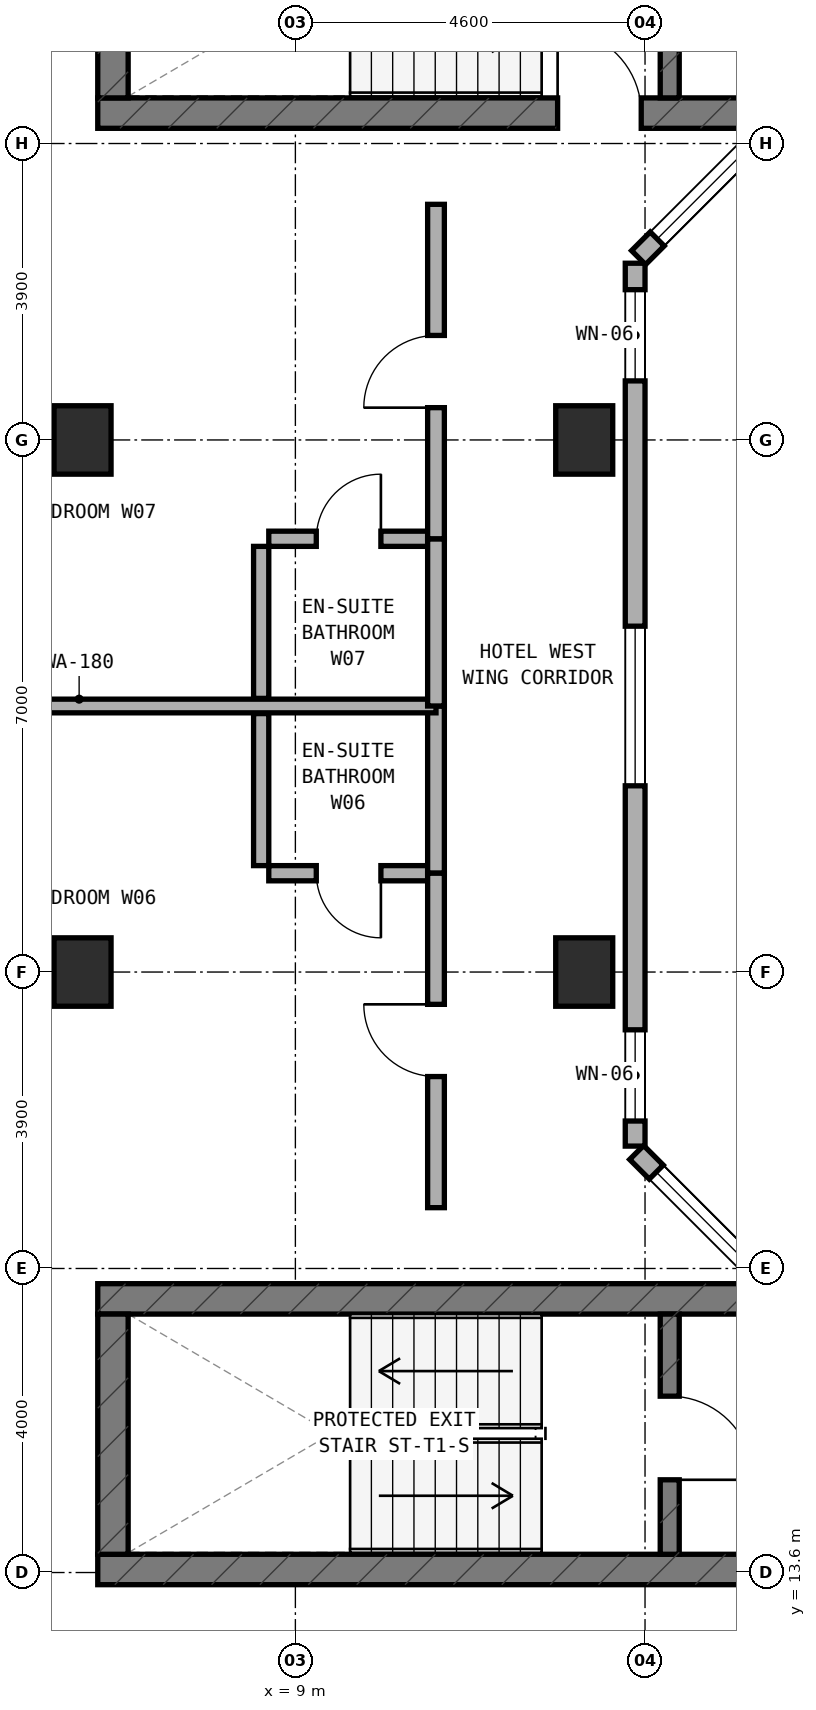
"""IFC4 building model, lengths in metres.
Left out: names, types, materials, properties, quantities, classifications, styles, units other than length and angle.
Written with IfcOpenShell. Run it as: python <this file> out.ifc"""

import sys

from ifc_helpers import new_model, si_unit, direction, frame, frame_2d, origin, origin_2d, place, context, subcontext, project, spatial, rectangle, extrude, element, fill, save


model = new_model("IFC4")
c1 = context("Model", 3, precision=1e-05, world=origin(), true_north=direction((0.0, 1.0)))
c2 = subcontext(c1, "Body", "Model", "MODEL_VIEW")
j1 = project(units=[si_unit("LENGTHUNIT", "METRE"), si_unit("PLANEANGLEUNIT", "RADIAN")], contexts=[c1])
p1 = place(None, origin())
s1 = spatial("IfcSite", under=j1, at=p1, CompositionType="ELEMENT")
p2 = place(p1, origin())
s2 = spatial("IfcBuilding", under=s1, at=p2, CompositionType="ELEMENT")
p3 = place(p2, frame((0.0, 0.0, 191.9)))
s3 = spatial("IfcBuildingStorey", under=s2, at=p3, CompositionType="ELEMENT", Elevation=191.9)
p4 = place(p3, frame((6.4, 32.8, 0.0), z_axis=(0.0, 0.0, 1.0), x_axis=(1.0, 0.0, 0.0)))
e1 = element("IfcWall", 1, at=p4, inside=s3, PredefinedType="SHEAR", context=c2, shape_type="SweptSolid", body=[
    extrude(rectangle(XDim=24.4, YDim=0.4, at=frame_2d((12.2, 0.0))), origin(), (0.0, 0.0, 1.0), 3.6),
])
p5 = place(p4, frame((6.05, 0.0, 0.0)))
e2 = element("IfcOpeningElement", 2, at=p5, cuts=e1, PredefinedType="OPENING", context=c2, shape_type="SweptSolid", body=[
    extrude(rectangle(XDim=1.1, YDim=2.15, at=frame_2d((0.55, 1.075))), frame((0.0, 0.21, 0.0), z_axis=(0.0, -1.0, 0.0), x_axis=(1.0, 0.0, 0.0)), (0.0, 0.0, 1.0), 0.42),
])
p6 = place(p3, frame((6.6, 33.0, 0.0), z_axis=(0.0, 0.0, 1.0), x_axis=(0.0, 1.0, 0.0)))
e3 = element("IfcWall", 3, at=p6, inside=s3, PredefinedType="SHEAR", context=c2, shape_type="SweptSolid", body=[
    extrude(rectangle(XDim=3.16, YDim=0.4, at=frame_2d((1.58, 0.0))), origin(), (0.0, 0.0, 1.0), 3.6),
])
p7 = place(p3, frame((13.925, 33.0, 0.0), z_axis=(0.0, 0.0, 1.0), x_axis=(0.0, 1.0, 0.0)))
e4 = element("IfcWall", 4, at=p7, inside=s3, PredefinedType="STANDARD", context=c2, shape_type="SweptSolid", body=[
    extrude(rectangle(XDim=3.16, YDim=0.25, at=frame_2d((1.58, 0.0))), origin(), (0.0, 0.0, 1.0), 3.32),
])
p8 = place(p7, frame((0.98, 0.0, 0.0)))
e5 = element("IfcOpeningElement", 5, at=p8, cuts=e4, PredefinedType="OPENING", context=c2, shape_type="SweptSolid", body=[
    extrude(rectangle(XDim=1.1, YDim=2.15, at=frame_2d((0.55, 1.075))), frame((0.0, 0.135, 0.0), z_axis=(0.0, -1.0, 0.0), x_axis=(1.0, 0.0, 0.0)), (0.0, 0.0, 1.0), 0.27),
])
p9 = place(p3, frame((6.4, 13.64, 0.0), z_axis=(0.0, 0.0, 1.0), x_axis=(1.0, 0.0, 0.0)))
e6 = element("IfcWall", 6, at=p9, inside=s3, PredefinedType="SHEAR", context=c2, shape_type="SweptSolid", body=[
    extrude(rectangle(XDim=24.4, YDim=0.4, at=frame_2d((12.2, 0.0))), origin(), (0.0, 0.0, 1.0), 3.6),
])
p10 = place(p9, frame((9.15, 0.0, 0.0)))
e7 = element("IfcOpeningElement", 7, at=p10, cuts=e6, PredefinedType="OPENING", context=c2, shape_type="SweptSolid", body=[
    extrude(rectangle(XDim=1.2, YDim=2.15, at=frame_2d((0.6, 1.075))), frame((0.0, 0.21, 0.0), z_axis=(0.0, -1.0, 0.0), x_axis=(1.0, 0.0, 0.0)), (0.0, 0.0, 1.0), 0.42),
])
p11 = place(p9, frame((16.94, 0.0, 0.0)))
e8 = element("IfcOpeningElement", 8, at=p11, cuts=e6, PredefinedType="OPENING", context=c2, shape_type="SweptSolid", body=[
    extrude(rectangle(XDim=0.85, YDim=2.1, at=frame_2d((0.425, 1.05))), frame((0.0, 0.21, 0.0), z_axis=(0.0, -1.0, 0.0), x_axis=(1.0, 0.0, 0.0)), (0.0, 0.0, 1.0), 0.42),
])
p12 = place(p9, frame((18.783, 0.0, 0.0)))
e9 = element("IfcOpeningElement", 9, at=p12, cuts=e6, PredefinedType="OPENING", context=c2, shape_type="SweptSolid", body=[
    extrude(rectangle(XDim=1.1, YDim=2.15, at=frame_2d((0.55, 1.075))), frame((0.0, 0.21, 0.0), z_axis=(0.0, -1.0, 0.0), x_axis=(1.0, 0.0, 0.0)), (0.0, 0.0, 1.0), 0.42),
])
p13 = place(p9, frame((20.65, 0.0, 0.0)))
e10 = element("IfcOpeningElement", 10, at=p13, cuts=e6, PredefinedType="OPENING", context=c2, shape_type="SweptSolid", body=[
    extrude(rectangle(XDim=1.1, YDim=2.15, at=frame_2d((0.55, 1.075))), frame((0.0, 0.21, 0.0), z_axis=(0.0, -1.0, 0.0), x_axis=(1.0, 0.0, 0.0)), (0.0, 0.0, 1.0), 0.42),
])
p14 = place(p9, frame((22.517, 0.0, 0.0)))
e11 = element("IfcOpeningElement", 11, at=p14, cuts=e6, PredefinedType="OPENING", context=c2, shape_type="SweptSolid", body=[
    extrude(rectangle(XDim=1.1, YDim=2.15, at=frame_2d((0.55, 1.075))), frame((0.0, 0.21, 0.0), z_axis=(0.0, -1.0, 0.0), x_axis=(1.0, 0.0, 0.0)), (0.0, 0.0, 1.0), 0.42),
])
p15 = place(p3, frame((6.4, 17.2, 0.0), z_axis=(0.0, 0.0, 1.0), x_axis=(1.0, 0.0, 0.0)))
e12 = element("IfcWall", 12, at=p15, inside=s3, PredefinedType="SHEAR", context=c2, shape_type="SweptSolid", body=[
    extrude(rectangle(XDim=24.4, YDim=0.4, at=frame_2d((12.2, 0.0))), origin(), (0.0, 0.0, 1.0), 3.6),
])
p16 = place(p3, frame((6.6, 13.84, 0.0), z_axis=(0.0, 0.0, 1.0), x_axis=(0.0, 1.0, 0.0)))
e13 = element("IfcWall", 13, at=p16, inside=s3, PredefinedType="SHEAR", context=c2, shape_type="SweptSolid", body=[
    extrude(rectangle(XDim=3.16, YDim=0.4, at=frame_2d((1.58, 0.0))), origin(), (0.0, 0.0, 1.0), 3.6),
])
p17 = place(p3, frame((13.925, 13.84, 0.0), z_axis=(0.0, 0.0, 1.0), x_axis=(0.0, 1.0, 0.0)))
e14 = element("IfcWall", 14, at=p17, inside=s3, PredefinedType="STANDARD", context=c2, shape_type="SweptSolid", body=[
    extrude(rectangle(XDim=3.16, YDim=0.25, at=frame_2d((1.58, 0.0))), origin(), (0.0, 0.0, 1.0), 3.32),
])
p18 = place(p17, frame((0.98, 0.0, 0.0)))
e15 = element("IfcOpeningElement", 15, at=p18, cuts=e14, PredefinedType="OPENING", context=c2, shape_type="SweptSolid", body=[
    extrude(rectangle(XDim=1.1, YDim=2.15, at=frame_2d((0.55, 1.075))), frame((0.0, 0.135, 0.0), z_axis=(0.0, -1.0, 0.0), x_axis=(1.0, 0.0, 0.0)), (0.0, 0.0, 1.0), 0.27),
])
for number, where, z_axis, x_axis in (
    (16, (6.2, 21.5, 0.0), (0.0, 0.0, 1.0), (1.0, 0.0, 0.0)),
    (17, (6.2, 28.5, 0.0), (0.0, 0.0, 1.0), (1.0, 0.0, 0.0)),
    (18, (12.8, 21.5, 0.0), (0.0, 0.0, 1.0), (1.0, 0.0, 0.0)),
    (19, (12.8, 28.5, 0.0), (0.0, 0.0, 1.0), (1.0, 0.0, 0.0)),
):
    element("IfcColumn", number, at=place(p3, frame(where, z_axis=z_axis, x_axis=x_axis)), inside=s3, PredefinedType="COLUMN", context=c2, shape_type="SweptSolid", body=[
        extrude(rectangle(XDim=0.75, YDim=0.9, at=origin_2d()), origin(), (0.0, 0.0, 1.0), 3.6),
    ])
p19 = place(p3, frame((15.278, 17.338, 0.0), z_axis=(0.0, 0.0, 1.0), x_axis=(-0.707106781187, 0.707106781187, 0.0)))
e20 = element("IfcWall", 20, at=p19, inside=s3, PredefinedType="STANDARD", context=c2, shape_type="SweptSolid", body=[
    extrude(rectangle(XDim=2.529, YDim=0.26, at=frame_2d((1.264, 0.0))), origin(), (0.0, 0.0, 1.0), 3.32),
])
p20 = place(p19, frame((0.364, 0.0, 0.85)))
e21 = element("IfcOpeningElement", 21, at=p20, cuts=e20, PredefinedType="OPENING", context=c2, shape_type="SweptSolid", body=[
    extrude(rectangle(XDim=1.8, YDim=1.5, at=frame_2d((0.9, 0.75))), frame((0.0, 0.14, 0.0), z_axis=(0.0, -1.0, 0.0), x_axis=(1.0, 0.0, 0.0)), (0.0, 0.0, 1.0), 0.28),
])
p21 = place(p3, frame((13.47, 19.21, 0.0), z_axis=(0.0, 0.0, 1.0), x_axis=(0.0, 1.0, 0.0)))
e22 = element("IfcWall", 22, at=p21, inside=s3, PredefinedType="STANDARD", context=c2, shape_type="SweptSolid", body=[
    extrude(rectangle(XDim=11.615, YDim=0.26, at=frame_2d((5.808, 0.0))), origin(), (0.0, 0.0, 1.0), 3.32),
])
p22 = place(p21, frame((0.33, 0.0, 0.5)))
e23 = element("IfcOpeningElement", 23, at=p22, cuts=e22, PredefinedType="OPENING", context=c2, shape_type="SweptSolid", body=[
    extrude(rectangle(XDim=1.2, YDim=1.9, at=frame_2d((0.6, 0.95))), frame((0.0, 0.14, 0.0), z_axis=(0.0, -1.0, 0.0), x_axis=(1.0, 0.0, 0.0)), (0.0, 0.0, 1.0), 0.28),
])
p23 = place(p21, frame((4.74, 0.0, 0.85)))
e24 = element("IfcOpeningElement", 24, at=p23, cuts=e22, PredefinedType="OPENING", context=c2, shape_type="SweptSolid", body=[
    extrude(rectangle(XDim=2.1, YDim=1.5, at=frame_2d((1.05, 0.75))), frame((0.0, 0.14, 0.0), z_axis=(0.0, -1.0, 0.0), x_axis=(1.0, 0.0, 0.0)), (0.0, 0.0, 1.0), 0.28),
])
p24 = place(p21, frame((10.067, 0.0, 0.5)))
e25 = element("IfcOpeningElement", 25, at=p24, cuts=e22, PredefinedType="OPENING", context=c2, shape_type="SweptSolid", body=[
    extrude(rectangle(XDim=1.2, YDim=1.9, at=frame_2d((0.6, 0.95))), frame((0.0, 0.14, 0.0), z_axis=(0.0, -1.0, 0.0), x_axis=(1.0, 0.0, 0.0)), (0.0, 0.0, 1.0), 0.28),
])
p25 = place(p3, frame((13.515, 30.899, 0.0), z_axis=(0.0, 0.0, 1.0), x_axis=(0.707106781187, 0.707106781187, 0.0)))
e26 = element("IfcWall", 26, at=p25, inside=s3, PredefinedType="STANDARD", context=c2, shape_type="SweptSolid", body=[
    extrude(rectangle(XDim=2.493, YDim=0.26, at=frame_2d((1.247, 0.0))), origin(), (0.0, 0.0, 1.0), 3.32),
])
p26 = place(p25, frame((0.347, 0.0, 0.85)))
e27 = element("IfcOpeningElement", 27, at=p26, cuts=e26, PredefinedType="OPENING", context=c2, shape_type="SweptSolid", body=[
    extrude(rectangle(XDim=1.8, YDim=1.5, at=frame_2d((0.9, 0.75))), frame((0.0, 0.14, 0.0), z_axis=(0.0, -1.0, 0.0), x_axis=(1.0, 0.0, 0.0)), (0.0, 0.0, 1.0), 0.28),
])
p27 = place(p3, frame((8.65, 22.8, 0.0), z_axis=(0.0, 0.0, 1.0), x_axis=(1.0, 0.0, 0.0)))
e28 = element("IfcWall", 28, at=p27, inside=s3, PredefinedType="PLUMBINGWALL", context=c2, shape_type="SweptSolid", body=[
    extrude(rectangle(XDim=2.1, YDim=0.2, at=frame_2d((1.05, 0.0))), origin(), (0.0, 0.0, 1.0), 3.32),
])
p28 = place(p27, frame((0.625, 0.0, 0.0)))
e29 = element("IfcOpeningElement", 29, at=p28, cuts=e28, PredefinedType="OPENING", context=c2, shape_type="SweptSolid", body=[
    extrude(rectangle(XDim=0.85, YDim=2.1, at=frame_2d((0.425, 1.05))), frame((0.0, 0.11, 0.0), z_axis=(0.0, -1.0, 0.0), x_axis=(1.0, 0.0, 0.0)), (0.0, 0.0, 1.0), 0.22),
])
p29 = place(p3, frame((8.55, 22.9, 0.0), z_axis=(0.0, 0.0, 1.0), x_axis=(0.0, 1.0, 0.0)))
e30 = element("IfcWall", 30, at=p29, inside=s3, PredefinedType="PLUMBINGWALL", context=c2, shape_type="SweptSolid", body=[
    extrude(rectangle(XDim=2.0, YDim=0.2, at=frame_2d((1.0, 0.0))), origin(), (0.0, 0.0, 1.0), 3.32),
])
p30 = place(p3, frame((10.85, 22.8, 0.0), z_axis=(0.0, 0.0, 1.0), x_axis=(0.0, 1.0, 0.0)))
e31 = element("IfcWall", 31, at=p30, inside=s3, PredefinedType="SOLIDWALL", context=c2, shape_type="SweptSolid", body=[
    extrude(rectangle(XDim=2.2, YDim=0.22, at=frame_2d((1.1, 0.0))), origin(), (0.0, 0.0, 1.0), 3.32),
])
p31 = place(p3, frame((10.85, 18.4, 0.0), z_axis=(0.0, 0.0, 1.0), x_axis=(0.0, 1.0, 0.0)))
e32 = element("IfcWall", 32, at=p31, inside=s3, PredefinedType="SOLIDWALL", context=c2, shape_type="SweptSolid", body=[
    extrude(rectangle(XDim=4.4, YDim=0.22, at=frame_2d((2.2, 0.0))), origin(), (0.0, 0.0, 1.0), 2.995),
])
p32 = place(p31, frame((1.725, 0.0, 0.0)))
e33 = element("IfcOpeningElement", 33, at=p32, cuts=e32, PredefinedType="OPENING", context=c2, shape_type="SweptSolid", body=[
    extrude(rectangle(XDim=0.95, YDim=2.1, at=frame_2d((0.475, 1.05))), frame((0.0, 0.12, 0.0), z_axis=(0.0, -1.0, 0.0), x_axis=(1.0, 0.0, 0.0)), (0.0, 0.0, 1.0), 0.24),
])
p33 = place(p3, frame((1.46, 25.0, 0.0), z_axis=(0.0, 0.0, 1.0), x_axis=(1.0, 0.0, 0.0)))
e34 = element("IfcWall", 34, at=p33, inside=s3, PredefinedType="SOLIDWALL", context=c2, shape_type="SweptSolid", body=[
    extrude(rectangle(XDim=9.39, YDim=0.18, at=frame_2d((4.695, 0.0))), origin(), (0.0, 0.0, 1.0), 2.935),
])
p34 = place(p3, frame((8.65, 27.2, 0.0), z_axis=(0.0, 0.0, 1.0), x_axis=(1.0, 0.0, 0.0)))
e35 = element("IfcWall", 35, at=p34, inside=s3, PredefinedType="PLUMBINGWALL", context=c2, shape_type="SweptSolid", body=[
    extrude(rectangle(XDim=2.1, YDim=0.2, at=frame_2d((1.05, 0.0))), origin(), (0.0, 0.0, 1.0), 3.32),
])
p35 = place(p34, frame((0.625, 0.0, 0.0)))
e36 = element("IfcOpeningElement", 36, at=p35, cuts=e35, PredefinedType="OPENING", context=c2, shape_type="SweptSolid", body=[
    extrude(rectangle(XDim=0.85, YDim=2.1, at=frame_2d((0.425, 1.05))), frame((0.0, 0.11, 0.0), z_axis=(0.0, -1.0, 0.0), x_axis=(1.0, 0.0, 0.0)), (0.0, 0.0, 1.0), 0.22),
])
p36 = place(p3, frame((8.55, 25.1, 0.0), z_axis=(0.0, 0.0, 1.0), x_axis=(0.0, 1.0, 0.0)))
e37 = element("IfcWall", 37, at=p36, inside=s3, PredefinedType="PLUMBINGWALL", context=c2, shape_type="SweptSolid", body=[
    extrude(rectangle(XDim=2.0, YDim=0.2, at=frame_2d((1.0, 0.0))), origin(), (0.0, 0.0, 1.0), 3.32),
])
p37 = place(p3, frame((10.85, 25.0, 0.0), z_axis=(0.0, 0.0, 1.0), x_axis=(0.0, 1.0, 0.0)))
e38 = element("IfcWall", 38, at=p37, inside=s3, PredefinedType="SOLIDWALL", context=c2, shape_type="SweptSolid", body=[
    extrude(rectangle(XDim=2.2, YDim=0.22, at=frame_2d((1.1, 0.0))), origin(), (0.0, 0.0, 1.0), 3.32),
])
p38 = place(p3, frame((10.85, 27.2, 0.0), z_axis=(0.0, 0.0, 1.0), x_axis=(0.0, 1.0, 0.0)))
e39 = element("IfcWall", 39, at=p38, inside=s3, PredefinedType="SOLIDWALL", context=c2, shape_type="SweptSolid", body=[
    extrude(rectangle(XDim=4.4, YDim=0.22, at=frame_2d((2.2, 0.0))), origin(), (0.0, 0.0, 1.0), 2.995),
])
p39 = place(p38, frame((1.725, 0.0, 0.0)))
e40 = element("IfcOpeningElement", 40, at=p39, cuts=e39, PredefinedType="OPENING", context=c2, shape_type="SweptSolid", body=[
    extrude(rectangle(XDim=0.95, YDim=2.1, at=frame_2d((0.475, 1.05))), frame((0.0, 0.12, 0.0), z_axis=(0.0, -1.0, 0.0), x_axis=(1.0, 0.0, 0.0)), (0.0, 0.0, 1.0), 0.24),
])
p40 = place(p20, origin())
e41 = element("IfcWindow", 41, at=p40, inside=s3, PartitioningType="SINGLE_PANEL", PredefinedType="WINDOW", context=c2, shape_type="SweptSolid", body=[
    extrude(rectangle(XDim=1.8, YDim=1.5, at=frame_2d((0.9, 0.75))), frame((0.0, 0.03, 0.0), z_axis=(0.0, -1.0, 0.0), x_axis=(1.0, 0.0, 0.0)), (0.0, 0.0, 1.0), 0.06),
])
fill(e21, e41)
p41 = place(p22, origin())
e42 = element("IfcWindow", 42, at=p41, inside=s3, PartitioningType="SINGLE_PANEL", PredefinedType="WINDOW", context=c2, shape_type="SweptSolid", body=[
    extrude(rectangle(XDim=1.2, YDim=1.9, at=frame_2d((0.6, 0.95))), frame((0.0, 0.03, 0.0), z_axis=(0.0, -1.0, 0.0), x_axis=(1.0, 0.0, 0.0)), (0.0, 0.0, 1.0), 0.06),
])
fill(e23, e42)
p42 = place(p23, origin())
e43 = element("IfcWindow", 43, at=p42, inside=s3, PartitioningType="SINGLE_PANEL", PredefinedType="WINDOW", context=c2, shape_type="SweptSolid", body=[
    extrude(rectangle(XDim=2.1, YDim=1.5, at=frame_2d((1.05, 0.75))), frame((0.0, 0.03, 0.0), z_axis=(0.0, -1.0, 0.0), x_axis=(1.0, 0.0, 0.0)), (0.0, 0.0, 1.0), 0.06),
])
fill(e24, e43)
p43 = place(p24, origin())
e44 = element("IfcWindow", 44, at=p43, inside=s3, PartitioningType="SINGLE_PANEL", PredefinedType="WINDOW", context=c2, shape_type="SweptSolid", body=[
    extrude(rectangle(XDim=1.2, YDim=1.9, at=frame_2d((0.6, 0.95))), frame((0.0, 0.03, 0.0), z_axis=(0.0, -1.0, 0.0), x_axis=(1.0, 0.0, 0.0)), (0.0, 0.0, 1.0), 0.06),
])
fill(e25, e44)
p44 = place(p26, origin())
e45 = element("IfcWindow", 45, at=p44, inside=s3, PartitioningType="SINGLE_PANEL", PredefinedType="WINDOW", context=c2, shape_type="SweptSolid", body=[
    extrude(rectangle(XDim=1.8, YDim=1.5, at=frame_2d((0.9, 0.75))), frame((0.0, 0.03, 0.0), z_axis=(0.0, -1.0, 0.0), x_axis=(1.0, 0.0, 0.0)), (0.0, 0.0, 1.0), 0.06),
])
fill(e27, e45)
p45 = place(p18, frame((1.1, 0.0, 0.0), z_axis=(0.0, 0.0, 1.0), x_axis=(-1.0, 0.0, 0.0)))
e46 = element("IfcDoor", 46, at=p45, inside=s3, OperationType="SINGLE_SWING_RIGHT", PredefinedType="DOOR", context=c2, shape_type="SweptSolid", body=[
    extrude(rectangle(XDim=1.1, YDim=2.15, at=frame_2d((0.55, 1.075))), frame((0.0, 0.025, 0.0), z_axis=(0.0, -1.0, 0.0), x_axis=(1.0, 0.0, 0.0)), (0.0, 0.0, 1.0), 0.05),
])
fill(e15, e46)
p46 = place(p5, origin())
e47 = element("IfcDoor", 47, at=p46, inside=s3, OperationType="SINGLE_SWING_LEFT", PredefinedType="DOOR", context=c2, shape_type="SweptSolid", body=[
    extrude(rectangle(XDim=1.1, YDim=2.15, at=frame_2d((0.55, 1.075))), frame((0.0, 0.025, 0.0), z_axis=(0.0, -1.0, 0.0), x_axis=(1.0, 0.0, 0.0)), (0.0, 0.0, 1.0), 0.05),
])
fill(e2, e47)
p47 = place(p28, frame((0.85, 0.0, 0.0), z_axis=(0.0, 0.0, 1.0), x_axis=(-1.0, 0.0, 0.0)))
e48 = element("IfcDoor", 48, at=p47, inside=s3, OperationType="SINGLE_SWING_LEFT", PredefinedType="DOOR", context=c2, shape_type="SweptSolid", body=[
    extrude(rectangle(XDim=0.85, YDim=2.1, at=frame_2d((0.425, 1.05))), frame((0.0, 0.025, 0.0), z_axis=(0.0, -1.0, 0.0), x_axis=(1.0, 0.0, 0.0)), (0.0, 0.0, 1.0), 0.05),
])
fill(e29, e48)
p48 = place(p32, origin())
e49 = element("IfcDoor", 49, at=p48, inside=s3, OperationType="SINGLE_SWING_RIGHT", PredefinedType="DOOR", context=c2, shape_type="SweptSolid", body=[
    extrude(rectangle(XDim=0.95, YDim=2.1, at=frame_2d((0.475, 1.05))), frame((0.0, 0.025, 0.0), z_axis=(0.0, -1.0, 0.0), x_axis=(1.0, 0.0, 0.0)), (0.0, 0.0, 1.0), 0.05),
])
fill(e33, e49)
p49 = place(p35, origin())
e50 = element("IfcDoor", 50, at=p49, inside=s3, OperationType="SINGLE_SWING_RIGHT", PredefinedType="DOOR", context=c2, shape_type="SweptSolid", body=[
    extrude(rectangle(XDim=0.85, YDim=2.1, at=frame_2d((0.425, 1.05))), frame((0.0, 0.025, 0.0), z_axis=(0.0, -1.0, 0.0), x_axis=(1.0, 0.0, 0.0)), (0.0, 0.0, 1.0), 0.05),
])
fill(e36, e50)
p50 = place(p39, origin())
e51 = element("IfcDoor", 51, at=p50, inside=s3, OperationType="SINGLE_SWING_LEFT", PredefinedType="DOOR", context=c2, shape_type="SweptSolid", body=[
    extrude(rectangle(XDim=0.95, YDim=2.1, at=frame_2d((0.475, 1.05))), frame((0.0, 0.025, 0.0), z_axis=(0.0, -1.0, 0.0), x_axis=(1.0, 0.0, 0.0)), (0.0, 0.0, 1.0), 0.05),
])
fill(e40, e51)
save(model, sys.argv[1])
